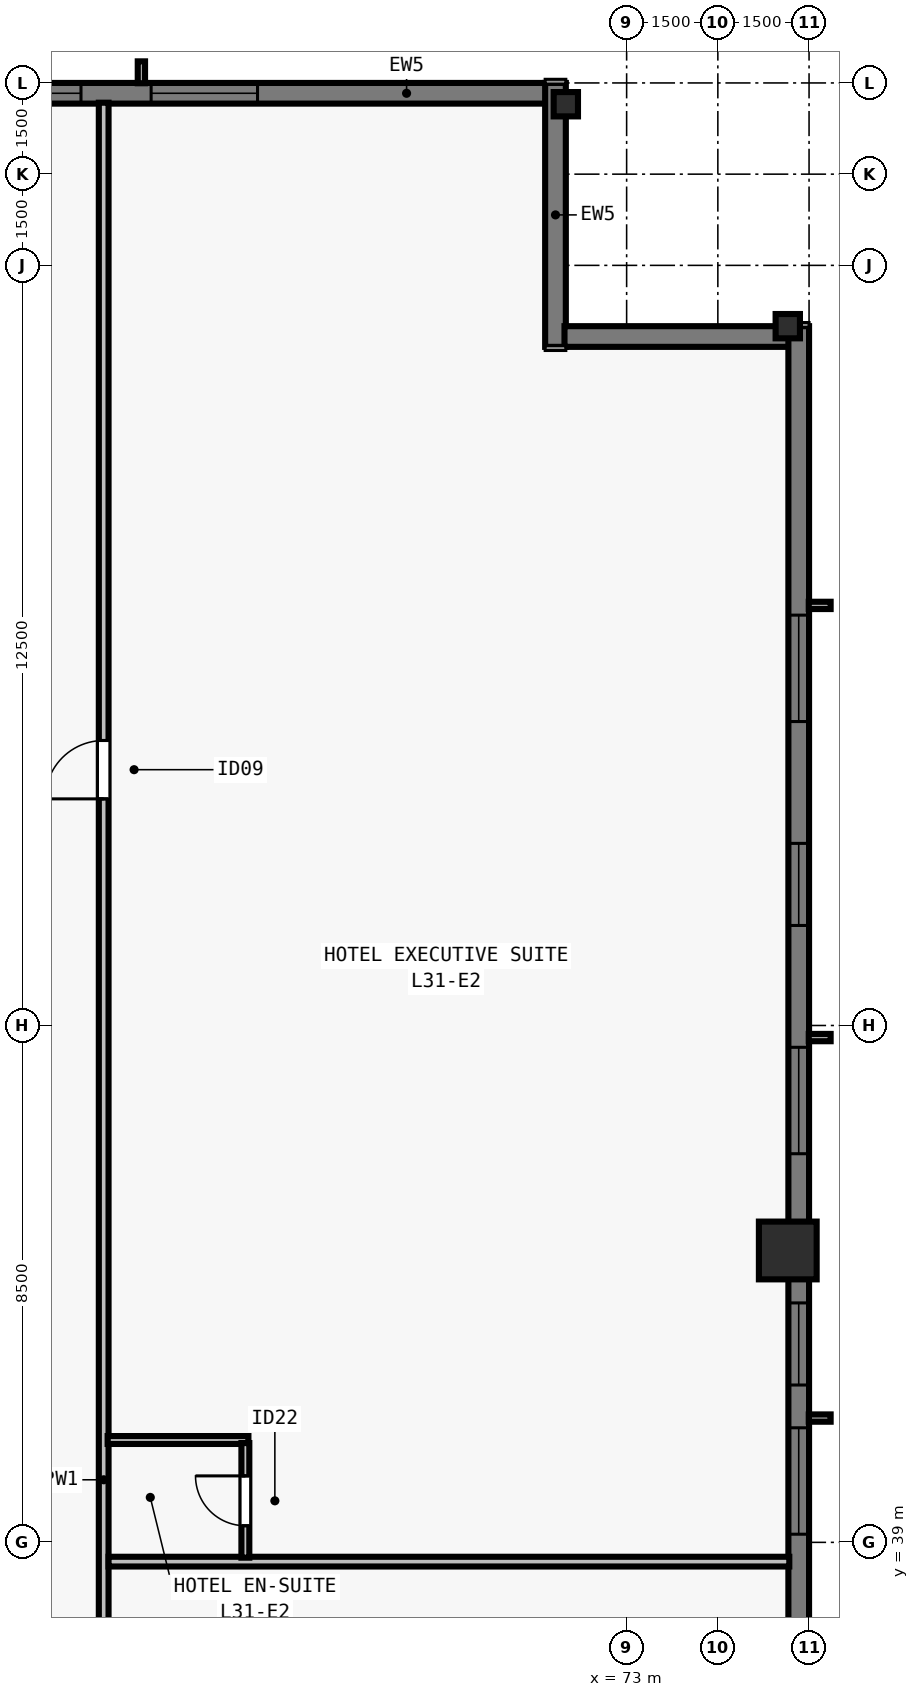
"""IFC4 building model, lengths in metres.
Left out: names, types, materials, properties, quantities, classifications, styles, units other than length and angle.
Written with IfcOpenShell. Run it as: python <this file> out.ifc"""

import sys

from ifc_helpers import new_model, si_unit, direction, frame, frame_2d, origin, origin_2d, place, context, subcontext, project, spatial, rectangle, i_section, extrude, element, fill, save


model = new_model("IFC4")
c1 = context("Model", 3, precision=1e-05, world=origin(), true_north=direction((0.0, 1.0)))
c2 = subcontext(c1, "Body", "Model", "MODEL_VIEW")
j1 = project(units=[si_unit("LENGTHUNIT", "METRE"), si_unit("PLANEANGLEUNIT", "RADIAN")], contexts=[c1])
p1 = place(None, origin())
s1 = spatial("IfcSite", under=j1, at=p1, CompositionType="ELEMENT")
p2 = place(p1, origin())
s2 = spatial("IfcBuilding", under=s1, at=p2, CompositionType="ELEMENT")
p3 = place(p2, frame((0.0, 0.0, 116.5)))
s3 = spatial("IfcBuildingStorey", under=s2, at=p3, CompositionType="ELEMENT", Elevation=116.5)
p4 = place(p3, frame((75.65, 43.8, 0.0), z_axis=(0.0, 0.0, 1.0), x_axis=(0.0, 1.0, 0.0)))
e1 = element("IfcColumn", 1, at=p4, inside=s3, PredefinedType="COLUMN", context=c2, shape_type="SweptSolid", body=[
    extrude(rectangle(XDim=0.95, YDim=0.95, at=origin_2d()), origin(), (0.0, 0.0, 1.0), 3.5),
])
for number, where, z_axis, x_axis in (
    (2, (75.65, 59.0, 0.0), (0.0, 0.0, 1.0), (0.0, 1.0, 0.0)),
    (3, (72.0, 62.65, 0.0), (0.0, 0.0, 1.0), (1.0, 0.0, 0.0)),
):
    element("IfcColumn", number, at=place(p3, frame(where, z_axis=z_axis, x_axis=x_axis)), inside=s3, PredefinedType="COLUMN", context=c2, shape_type="SweptSolid", body=[
        extrude(i_section(OverallWidth=0.4, OverallDepth=0.4, WebThickness=0.022, FlangeThickness=0.036, at=origin_2d()), origin(), (0.0, 0.0, 1.0), 3.5),
    ])
p5 = place(p3, frame((32.0, 62.83, 0.0), z_axis=(0.0, 0.0, 1.0), x_axis=(1.0, 0.0, 0.0)))
e4 = element("IfcWall", 4, at=p5, inside=s3, PredefinedType="SOLIDWALL", context=c2, shape_type="SweptSolid", body=[
    extrude(rectangle(XDim=39.682, YDim=0.34, at=frame_2d((19.841, 0.0))), origin(), (0.0, 0.0, 1.0), 3.28),
])
p6 = place(p5, frame((3.902, 0.0, 0.8)))
e5 = element("IfcOpeningElement", 5, at=p6, cuts=e4, PredefinedType="OPENING", context=c2, shape_type="SweptSolid", body=[
    extrude(rectangle(XDim=1.75, YDim=1.66, at=frame_2d((0.875, 0.83))), frame((0.0, 0.18, 0.0), z_axis=(0.0, -1.0, 0.0), x_axis=(1.0, 0.0, 0.0)), (0.0, 0.0, 1.0), 0.36),
])
p7 = place(p5, frame((8.505, 0.0, 0.8)))
e6 = element("IfcOpeningElement", 6, at=p7, cuts=e4, PredefinedType="OPENING", context=c2, shape_type="SweptSolid", body=[
    extrude(rectangle(XDim=1.35, YDim=1.66, at=frame_2d((0.675, 0.83))), frame((0.0, 0.18, 0.0), z_axis=(0.0, -1.0, 0.0), x_axis=(1.0, 0.0, 0.0)), (0.0, 0.0, 1.0), 0.36),
])
p8 = place(p5, frame((11.859, 0.0, 0.8)))
e7 = element("IfcOpeningElement", 7, at=p8, cuts=e4, PredefinedType="OPENING", context=c2, shape_type="SweptSolid", body=[
    extrude(rectangle(XDim=1.75, YDim=1.66, at=frame_2d((0.875, 0.83))), frame((0.0, 0.18, 0.0), z_axis=(0.0, -1.0, 0.0), x_axis=(1.0, 0.0, 0.0)), (0.0, 0.0, 1.0), 0.36),
])
p9 = place(p5, frame((16.062, 0.0, 0.8)))
e8 = element("IfcOpeningElement", 8, at=p9, cuts=e4, PredefinedType="OPENING", context=c2, shape_type="SweptSolid", body=[
    extrude(rectangle(XDim=1.35, YDim=1.66, at=frame_2d((0.675, 0.83))), frame((0.0, 0.18, 0.0), z_axis=(0.0, -1.0, 0.0), x_axis=(1.0, 0.0, 0.0)), (0.0, 0.0, 1.0), 0.36),
])
p10 = place(p5, frame((17.716, 0.0, 0.8)))
e9 = element("IfcOpeningElement", 9, at=p10, cuts=e4, PredefinedType="OPENING", context=c2, shape_type="SweptSolid", body=[
    extrude(rectangle(XDim=1.75, YDim=1.66, at=frame_2d((0.875, 0.83))), frame((0.0, 0.18, 0.0), z_axis=(0.0, -1.0, 0.0), x_axis=(1.0, 0.0, 0.0)), (0.0, 0.0, 1.0), 0.36),
])
p11 = place(p5, frame((22.719, 0.0, 0.8)))
e10 = element("IfcOpeningElement", 10, at=p11, cuts=e4, PredefinedType="OPENING", context=c2, shape_type="SweptSolid", body=[
    extrude(rectangle(XDim=1.35, YDim=1.66, at=frame_2d((0.675, 0.83))), frame((0.0, 0.18, 0.0), z_axis=(0.0, -1.0, 0.0), x_axis=(1.0, 0.0, 0.0)), (0.0, 0.0, 1.0), 0.36),
])
p12 = place(p5, frame((26.073, 0.0, 0.8)))
e11 = element("IfcOpeningElement", 11, at=p12, cuts=e4, PredefinedType="OPENING", context=c2, shape_type="SweptSolid", body=[
    extrude(rectangle(XDim=1.75, YDim=1.66, at=frame_2d((0.875, 0.83))), frame((0.0, 0.18, 0.0), z_axis=(0.0, -1.0, 0.0), x_axis=(1.0, 0.0, 0.0)), (0.0, 0.0, 1.0), 0.36),
])
p13 = place(p5, frame((30.677, 0.0, 0.8)))
e12 = element("IfcOpeningElement", 12, at=p13, cuts=e4, PredefinedType="OPENING", context=c2, shape_type="SweptSolid", body=[
    extrude(rectangle(XDim=1.35, YDim=1.66, at=frame_2d((0.675, 0.83))), frame((0.0, 0.18, 0.0), z_axis=(0.0, -1.0, 0.0), x_axis=(1.0, 0.0, 0.0)), (0.0, 0.0, 1.0), 0.36),
])
p14 = place(p5, frame((33.18, 0.0, 0.8)))
e13 = element("IfcOpeningElement", 13, at=p14, cuts=e4, PredefinedType="OPENING", context=c2, shape_type="SweptSolid", body=[
    extrude(rectangle(XDim=1.75, YDim=1.66, at=frame_2d((0.875, 0.83))), frame((0.0, 0.18, 0.0), z_axis=(0.0, -1.0, 0.0), x_axis=(1.0, 0.0, 0.0)), (0.0, 0.0, 1.0), 0.36),
])
p15 = place(p3, frame((71.83, 63.0, 0.0), z_axis=(0.0, 0.0, 1.0), x_axis=(0.0, -1.0, 0.0)))
e14 = element("IfcWall", 14, at=p15, inside=s3, PredefinedType="SOLIDWALL", context=c2, shape_type="SweptSolid", body=[
    extrude(rectangle(XDim=4.34, YDim=0.34, at=frame_2d((2.17, 0.0))), origin(), (0.0, 0.0, 1.0), 3.28),
])
p16 = place(p3, frame((71.978, 58.83, 0.0), z_axis=(0.0, 0.0, 1.0), x_axis=(1.0, 0.0, 0.0)))
e15 = element("IfcWall", 15, at=p16, inside=s3, PredefinedType="SOLIDWALL", context=c2, shape_type="SweptSolid", body=[
    extrude(rectangle(XDim=3.704, YDim=0.34, at=frame_2d((1.852, 0.0))), origin(), (0.0, 0.0, 1.0), 3.28),
])
p17 = place(p3, frame((75.83, 59.0, 0.0), z_axis=(0.0, 0.0, 1.0), x_axis=(0.0, -1.0, 0.0)))
e16 = element("IfcWall", 16, at=p17, inside=s3, PredefinedType="SOLIDWALL", context=c2, shape_type="SweptSolid", body=[
    extrude(rectangle(XDim=39.682, YDim=0.34, at=frame_2d((19.841, 0.0))), origin(), (0.0, 0.0, 1.0), 3.28),
])
p18 = place(p17, frame((4.752, 0.0, 0.8)))
e17 = element("IfcOpeningElement", 17, at=p18, cuts=e16, PredefinedType="OPENING", context=c2, shape_type="SweptSolid", body=[
    extrude(rectangle(XDim=1.75, YDim=1.66, at=frame_2d((0.875, 0.83))), frame((0.0, 0.18, 0.0), z_axis=(0.0, -1.0, 0.0), x_axis=(1.0, 0.0, 0.0)), (0.0, 0.0, 1.0), 0.36),
])
p19 = place(p17, frame((8.505, 0.0, 0.8)))
e18 = element("IfcOpeningElement", 18, at=p19, cuts=e16, PredefinedType="OPENING", context=c2, shape_type="SweptSolid", body=[
    extrude(rectangle(XDim=1.35, YDim=1.66, at=frame_2d((0.675, 0.83))), frame((0.0, 0.18, 0.0), z_axis=(0.0, -1.0, 0.0), x_axis=(1.0, 0.0, 0.0)), (0.0, 0.0, 1.0), 0.36),
])
p20 = place(p17, frame((11.859, 0.0, 0.8)))
e19 = element("IfcOpeningElement", 19, at=p20, cuts=e16, PredefinedType="OPENING", context=c2, shape_type="SweptSolid", body=[
    extrude(rectangle(XDim=1.75, YDim=1.66, at=frame_2d((0.875, 0.83))), frame((0.0, 0.18, 0.0), z_axis=(0.0, -1.0, 0.0), x_axis=(1.0, 0.0, 0.0)), (0.0, 0.0, 1.0), 0.36),
])
p21 = place(p17, frame((16.062, 0.0, 0.8)))
e20 = element("IfcOpeningElement", 20, at=p21, cuts=e16, PredefinedType="OPENING", context=c2, shape_type="SweptSolid", body=[
    extrude(rectangle(XDim=1.35, YDim=1.66, at=frame_2d((0.675, 0.83))), frame((0.0, 0.18, 0.0), z_axis=(0.0, -1.0, 0.0), x_axis=(1.0, 0.0, 0.0)), (0.0, 0.0, 1.0), 0.36),
])
p22 = place(p17, frame((18.116, 0.0, 0.8)))
e21 = element("IfcOpeningElement", 21, at=p22, cuts=e16, PredefinedType="OPENING", context=c2, shape_type="SweptSolid", body=[
    extrude(rectangle(XDim=1.75, YDim=1.66, at=frame_2d((0.875, 0.83))), frame((0.0, 0.18, 0.0), z_axis=(0.0, -1.0, 0.0), x_axis=(1.0, 0.0, 0.0)), (0.0, 0.0, 1.0), 0.36),
])
p23 = place(p17, frame((22.719, 0.0, 0.8)))
e22 = element("IfcOpeningElement", 22, at=p23, cuts=e16, PredefinedType="OPENING", context=c2, shape_type="SweptSolid", body=[
    extrude(rectangle(XDim=1.35, YDim=1.66, at=frame_2d((0.675, 0.83))), frame((0.0, 0.18, 0.0), z_axis=(0.0, -1.0, 0.0), x_axis=(1.0, 0.0, 0.0)), (0.0, 0.0, 1.0), 0.36),
])
p24 = place(p17, frame((26.073, 0.0, 0.8)))
e23 = element("IfcOpeningElement", 23, at=p24, cuts=e16, PredefinedType="OPENING", context=c2, shape_type="SweptSolid", body=[
    extrude(rectangle(XDim=1.75, YDim=1.66, at=frame_2d((0.875, 0.83))), frame((0.0, 0.18, 0.0), z_axis=(0.0, -1.0, 0.0), x_axis=(1.0, 0.0, 0.0)), (0.0, 0.0, 1.0), 0.36),
])
p25 = place(p17, frame((29.827, 0.0, 0.8)))
e24 = element("IfcOpeningElement", 24, at=p25, cuts=e16, PredefinedType="OPENING", context=c2, shape_type="SweptSolid", body=[
    extrude(rectangle(XDim=1.35, YDim=1.66, at=frame_2d((0.675, 0.83))), frame((0.0, 0.18, 0.0), z_axis=(0.0, -1.0, 0.0), x_axis=(1.0, 0.0, 0.0)), (0.0, 0.0, 1.0), 0.36),
])
p26 = place(p17, frame((33.18, 0.0, 0.8)))
e25 = element("IfcOpeningElement", 25, at=p26, cuts=e16, PredefinedType="OPENING", context=c2, shape_type="SweptSolid", body=[
    extrude(rectangle(XDim=1.75, YDim=1.66, at=frame_2d((0.875, 0.83))), frame((0.0, 0.18, 0.0), z_axis=(0.0, -1.0, 0.0), x_axis=(1.0, 0.0, 0.0)), (0.0, 0.0, 1.0), 0.36),
])
p27 = place(p3, frame((64.4, 15.325, 0.0), z_axis=(0.0, 0.0, 1.0), x_axis=(0.0, 1.0, 0.0)))
e26 = element("IfcWall", 26, at=p27, inside=s3, PredefinedType="PARTITIONING", context=c2, shape_type="SweptSolid", body=[
    extrude(rectangle(XDim=47.35, YDim=0.16, at=frame_2d((23.675, 0.0))), origin(), (0.0, 0.0, 1.0), 2.555),
])
p28 = place(p27, frame((12.547, 0.0, 0.0)))
e27 = element("IfcOpeningElement", 27, at=p28, cuts=e26, PredefinedType="OPENING", context=c2, shape_type="SweptSolid", body=[
    extrude(rectangle(XDim=0.96, YDim=2.15, at=frame_2d((0.48, 1.075))), frame((0.0, 0.09, 0.0), z_axis=(0.0, -1.0, 0.0), x_axis=(1.0, 0.0, 0.0)), (0.0, 0.0, 1.0), 0.18),
])
p29 = place(p27, frame((35.902, 0.0, 0.0)))
e28 = element("IfcOpeningElement", 28, at=p29, cuts=e26, PredefinedType="OPENING", context=c2, shape_type="SweptSolid", body=[
    extrude(rectangle(XDim=0.96, YDim=2.15, at=frame_2d((0.48, 1.075))), frame((0.0, 0.09, 0.0), z_axis=(0.0, -1.0, 0.0), x_axis=(1.0, 0.0, 0.0)), (0.0, 0.0, 1.0), 0.18),
])
p30 = place(p3, frame((64.48, 38.683, 0.0), z_axis=(0.0, 0.0, 1.0), x_axis=(1.0, 0.0, 0.0)))
e29 = element("IfcWall", 29, at=p30, inside=s3, PredefinedType="PARTITIONING", context=c2, shape_type="SweptSolid", body=[
    extrude(rectangle(XDim=11.195, YDim=0.16, at=frame_2d((5.598, 0.0))), origin(), (0.0, 0.0, 1.0), 3.28),
])
p31 = place(p3, frame((64.465, 40.683, 0.0), z_axis=(0.0, 0.0, 1.0), x_axis=(1.0, 0.0, 0.0)))
e30 = element("IfcWall", 30, at=p31, inside=s3, PredefinedType="PLUMBINGWALL", context=c2, shape_type="SweptSolid", body=[
    extrude(rectangle(XDim=2.315, YDim=0.13, at=frame_2d((1.157, 0.0))), origin(), (0.0, 0.0, 1.0), 3.28),
])
p32 = place(p3, frame((66.73, 38.748, 0.0), z_axis=(0.0, 0.0, 1.0), x_axis=(0.0, 1.0, 0.0)))
e31 = element("IfcWall", 31, at=p32, inside=s3, PredefinedType="PLUMBINGWALL", context=c2, shape_type="SweptSolid", body=[
    extrude(rectangle(XDim=1.885, YDim=0.13, at=frame_2d((0.942, 0.0))), origin(), (0.0, 0.0, 1.0), 3.28),
])
p33 = place(p32, frame((0.525, 0.0, 0.0)))
e32 = element("IfcOpeningElement", 32, at=p33, cuts=e31, PredefinedType="OPENING", context=c2, shape_type="SweptSolid", body=[
    extrude(rectangle(XDim=0.82, YDim=2.1, at=frame_2d((0.41, 1.05))), frame((0.0, 0.075, 0.0), z_axis=(0.0, -1.0, 0.0), x_axis=(1.0, 0.0, 0.0)), (0.0, 0.0, 1.0), 0.15),
])
p34 = place(p13, origin())
e33 = element("IfcWindow", 33, at=p34, inside=s3, PartitioningType="SINGLE_PANEL", PredefinedType="WINDOW", context=c2, shape_type="SweptSolid", body=[
    extrude(rectangle(XDim=1.35, YDim=1.66, at=frame_2d((0.675, 0.83))), frame((0.0, -0.05, 0.0), z_axis=(0.0, -1.0, 0.0), x_axis=(1.0, 0.0, 0.0)), (0.0, 0.0, 1.0), 0.06),
])
fill(e12, e33)
p35 = place(p14, origin())
e34 = element("IfcWindow", 34, at=p35, inside=s3, PartitioningType="SINGLE_PANEL", PredefinedType="WINDOW", context=c2, shape_type="SweptSolid", body=[
    extrude(rectangle(XDim=1.75, YDim=1.66, at=frame_2d((0.875, 0.83))), frame((0.0, -0.05, 0.0), z_axis=(0.0, -1.0, 0.0), x_axis=(1.0, 0.0, 0.0)), (0.0, 0.0, 1.0), 0.06),
])
fill(e13, e34)
p36 = place(p18, origin())
e35 = element("IfcWindow", 35, at=p36, inside=s3, PartitioningType="SINGLE_PANEL", PredefinedType="WINDOW", context=c2, shape_type="SweptSolid", body=[
    extrude(rectangle(XDim=1.75, YDim=1.66, at=frame_2d((0.875, 0.83))), frame((0.0, -0.05, 0.0), z_axis=(0.0, -1.0, 0.0), x_axis=(1.0, 0.0, 0.0)), (0.0, 0.0, 1.0), 0.06),
])
fill(e17, e35)
p37 = place(p19, origin())
e36 = element("IfcWindow", 36, at=p37, inside=s3, PartitioningType="SINGLE_PANEL", PredefinedType="WINDOW", context=c2, shape_type="SweptSolid", body=[
    extrude(rectangle(XDim=1.35, YDim=1.66, at=frame_2d((0.675, 0.83))), frame((0.0, -0.05, 0.0), z_axis=(0.0, -1.0, 0.0), x_axis=(1.0, 0.0, 0.0)), (0.0, 0.0, 1.0), 0.06),
])
fill(e18, e36)
p38 = place(p20, origin())
e37 = element("IfcWindow", 37, at=p38, inside=s3, PartitioningType="SINGLE_PANEL", PredefinedType="WINDOW", context=c2, shape_type="SweptSolid", body=[
    extrude(rectangle(XDim=1.75, YDim=1.66, at=frame_2d((0.875, 0.83))), frame((0.0, -0.05, 0.0), z_axis=(0.0, -1.0, 0.0), x_axis=(1.0, 0.0, 0.0)), (0.0, 0.0, 1.0), 0.06),
])
fill(e19, e37)
p39 = place(p21, origin())
e38 = element("IfcWindow", 38, at=p39, inside=s3, PartitioningType="SINGLE_PANEL", PredefinedType="WINDOW", context=c2, shape_type="SweptSolid", body=[
    extrude(rectangle(XDim=1.35, YDim=1.66, at=frame_2d((0.675, 0.83))), frame((0.0, -0.05, 0.0), z_axis=(0.0, -1.0, 0.0), x_axis=(1.0, 0.0, 0.0)), (0.0, 0.0, 1.0), 0.06),
])
fill(e20, e38)
p40 = place(p22, origin())
e39 = element("IfcWindow", 39, at=p40, inside=s3, PartitioningType="SINGLE_PANEL", PredefinedType="WINDOW", context=c2, shape_type="SweptSolid", body=[
    extrude(rectangle(XDim=1.75, YDim=1.66, at=frame_2d((0.875, 0.83))), frame((0.0, -0.05, 0.0), z_axis=(0.0, -1.0, 0.0), x_axis=(1.0, 0.0, 0.0)), (0.0, 0.0, 1.0), 0.06),
])
fill(e21, e39)
p41 = place(p33, origin())
e40 = element("IfcDoor", 40, at=p41, inside=s3, OperationType="SINGLE_SWING_RIGHT", PredefinedType="DOOR", context=c2, shape_type="SweptSolid", body=[
    extrude(rectangle(XDim=0.82, YDim=2.1, at=frame_2d((0.41, 1.05))), frame((0.0, 0.025, 0.0), z_axis=(0.0, -1.0, 0.0), x_axis=(1.0, 0.0, 0.0)), (0.0, 0.0, 1.0), 0.05),
])
fill(e32, e40)
p42 = place(p29, origin())
e41 = element("IfcDoor", 41, at=p42, inside=s3, OperationType="SINGLE_SWING_LEFT", PredefinedType="DOOR", context=c2, shape_type="SweptSolid", body=[
    extrude(rectangle(XDim=0.96, YDim=2.15, at=frame_2d((0.48, 1.075))), frame((0.0, 0.025, 0.0), z_axis=(0.0, -1.0, 0.0), x_axis=(1.0, 0.0, 0.0)), (0.0, 0.0, 1.0), 0.05),
])
fill(e28, e41)
save(model, sys.argv[1])
